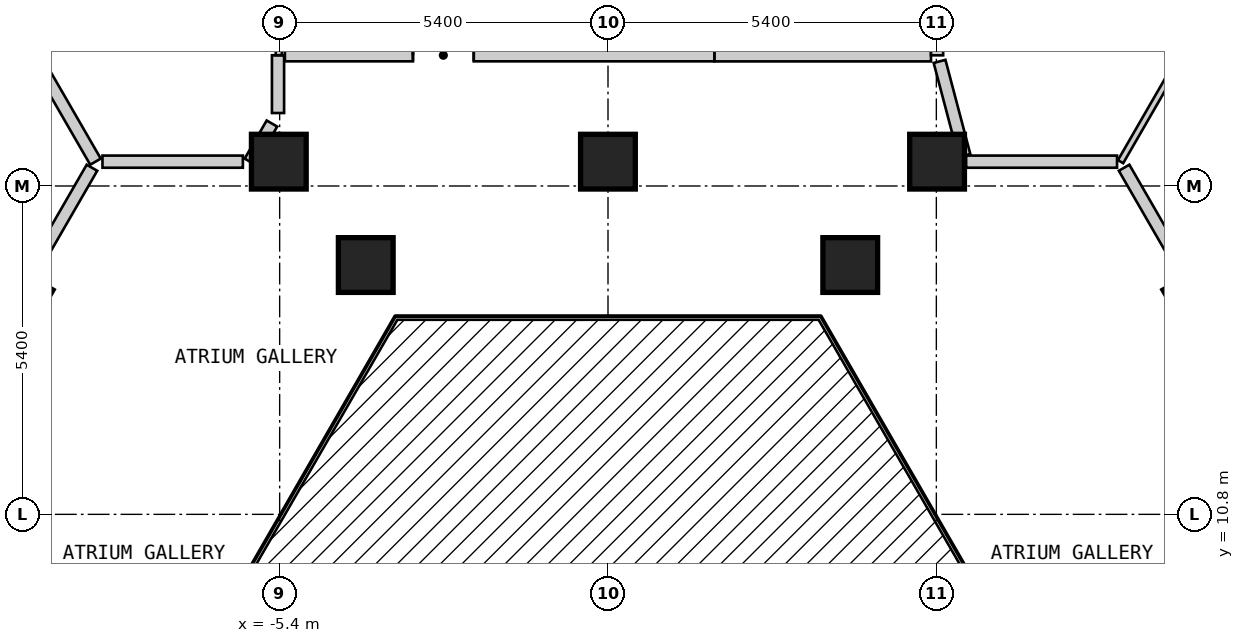
"""IFC4 building model, lengths in metres.
Left out: names, types, materials, properties, quantities, classifications, styles, units other than length and angle.
Written with IfcOpenShell. Run it as: python <this file> out.ifc"""

import sys

from ifc_helpers import new_model, si_unit, direction, frame, frame_2d, origin, origin_2d, place, context, subcontext, project, spatial, rectangle, extrude, element, fill, save


model = new_model("IFC4")
c1 = context("Model", 3, precision=1e-05, world=origin(), true_north=direction((0.0, 1.0)))
c2 = subcontext(c1, "Body", "Model", "MODEL_VIEW")
j1 = project(units=[si_unit("LENGTHUNIT", "METRE"), si_unit("PLANEANGLEUNIT", "RADIAN")], contexts=[c1])
p1 = place(None, origin())
s1 = spatial("IfcSite", under=j1, at=p1, CompositionType="ELEMENT")
p2 = place(p1, origin())
s2 = spatial("IfcBuilding", under=s1, at=p2, CompositionType="ELEMENT")
p3 = place(p2, frame((0.0, 0.0, 90.0)))
s3 = spatial("IfcBuildingStorey", under=s2, at=p3, CompositionType="ELEMENT", Elevation=90.0)
for number, where, z_axis, x_axis in (
    (1, (9.743, 14.325, 0.0), (0.0, 0.0, 1.0), (-0.5, 0.866, 0.0)),
    (2, (5.412, 16.6, 0.0), (0.0, 0.0, 1.0), (-1.0, 0.0, 0.0)),
    (3, (3.984, 14.9, 0.0), (0.0, 0.0, 1.0), (1.0, 0.0, 0.0)),
    (4, (-0.001, 16.6, 0.0), (0.0, 0.0, 1.0), (-1.0, 0.0, 0.0)),
    (5, (-3.984, 14.9, 0.0), (0.0, 0.0, 1.0), (1.0, 0.0, 0.0)),
    (6, (-5.414, 16.6, 0.0), (0.0, 0.0, 1.0), (-1.0, 0.0, 0.0)),
    (7, (-9.743, 14.325, 0.0), (0.0, 0.0, 1.0), (-0.5, -0.866, 0.0)),
):
    element("IfcColumn", number, at=place(p3, frame(where, z_axis=z_axis, x_axis=x_axis)), inside=s3, PredefinedType="COLUMN", context=c2, shape_type="SweptSolid", body=[
        extrude(rectangle(XDim=0.9, YDim=0.9, at=origin_2d()), origin(), (0.0, 0.0, 1.0), 3.0),
    ])
p4 = place(p3, frame((5.453, 18.249, 0.0), z_axis=(0.0, 0.0, 1.0), x_axis=(0.255385747764, -0.966839241983, 0.0)))
e8 = element("IfcWall", 8, at=p4, inside=s3, PredefinedType="PARTITIONING", context=c2, shape_type="SweptSolid", body=[
    extrude(rectangle(XDim=1.602, YDim=0.2, at=frame_2d((0.801, 0.0))), origin(), (0.0, 0.0, 1.0), 2.7),
])
p5 = place(p3, frame((8.488, 16.5, 0.0), z_axis=(0.0, 0.0, 1.0), x_axis=(0.499986836607, -0.86603300354, 0.0)))
e9 = element("IfcWall", 9, at=p5, inside=s3, PredefinedType="PARTITIONING", context=c2, shape_type="SweptSolid", body=[
    extrude(rectangle(XDim=20.09, YDim=0.2, at=frame_2d((10.045, 0.0))), origin(), (0.0, 0.0, 1.0), 2.7),
])
p6 = place(p5, frame((14.569, 0.0, 0.0)))
e10 = element("IfcOpeningElement", 10, at=p6, cuts=e9, PredefinedType="OPENING", context=c2, shape_type="SweptSolid", body=[
    extrude(rectangle(XDim=1.0, YDim=2.1, at=frame_2d((0.5, 1.05))), frame((0.0, 0.11, 0.0), z_axis=(0.0, -1.0, 0.0), x_axis=(1.0, 0.0, 0.0)), (0.0, 0.0, 1.0), 0.22),
])
p7 = place(p5, frame((4.547, 0.0, 0.0)))
e11 = element("IfcOpeningElement", 11, at=p7, cuts=e9, PredefinedType="OPENING", context=c2, shape_type="SweptSolid", body=[
    extrude(rectangle(XDim=1.0, YDim=2.1, at=frame_2d((0.5, 1.05))), frame((0.0, 0.11, 0.0), z_axis=(0.0, -1.0, 0.0), x_axis=(1.0, 0.0, 0.0)), (0.0, 0.0, 1.0), 0.22),
])
p8 = place(p3, frame((-8.314, 16.6, 0.0), z_axis=(0.0, 0.0, 1.0), x_axis=(1.0, 0.0, 0.0)))
e12 = element("IfcWall", 12, at=p8, inside=s3, PredefinedType="PARTITIONING", context=c2, shape_type="SweptSolid", body=[
    extrude(rectangle(XDim=2.309, YDim=0.2, at=frame_2d((1.155, 0.0))), origin(), (0.0, 0.0, 1.0), 2.7),
])
p9 = place(p3, frame((5.889, 16.6, 0.0), z_axis=(0.0, 0.0, 1.0), x_axis=(1.0, 0.0, 0.0)))
e13 = element("IfcWall", 13, at=p9, inside=s3, PredefinedType="PARTITIONING", context=c2, shape_type="SweptSolid", body=[
    extrude(rectangle(XDim=2.483, YDim=0.2, at=frame_2d((1.242, 0.0))), origin(), (0.0, 0.0, 1.0), 2.7),
])
p10 = place(p3, frame((1.75, 18.349, 0.0), z_axis=(0.0, 0.0, 1.0), x_axis=(1.0, 0.0, 0.0)))
e14 = element("IfcWall", 14, at=p10, inside=s3, PredefinedType="PARTITIONING", context=c2, shape_type="SweptSolid", body=[
    extrude(rectangle(XDim=3.562, YDim=0.2, at=frame_2d((1.781, 0.0))), origin(), (0.0, 0.0, 1.0), 2.7),
])
p11 = place(p3, frame((-5.314, 18.35, 0.0), z_axis=(0.0, 0.0, 1.0), x_axis=(1.0, 0.0, 0.0)))
e15 = element("IfcWall", 15, at=p11, inside=s3, PredefinedType="PARTITIONING", context=c2, shape_type="SweptSolid", body=[
    extrude(rectangle(XDim=7.063, YDim=0.2, at=frame_2d((3.531, 0.0))), origin(), (0.0, 0.0, 1.0), 2.7),
])
p12 = place(p11, frame((2.106, 0.0, 0.0)))
e16 = element("IfcOpeningElement", 16, at=p12, cuts=e15, PredefinedType="OPENING", context=c2, shape_type="SweptSolid", body=[
    extrude(rectangle(XDim=1.0, YDim=2.1, at=frame_2d((0.5, 1.05))), frame((0.0, 0.11, 0.0), z_axis=(0.0, -1.0, 0.0), x_axis=(1.0, 0.0, 0.0)), (0.0, 0.0, 1.0), 0.22),
])
p13 = place(p3, frame((-5.889, 16.6, 0.0), z_axis=(0.0, 0.0, 1.0), x_axis=(0.499839240638, 0.866118198353, 0.0)))
e17 = element("IfcWall", 17, at=p13, inside=s3, PredefinedType="PARTITIONING", context=c2, shape_type="SweptSolid", body=[
    extrude(rectangle(XDim=0.724, YDim=0.2, at=frame_2d((0.362, 0.0))), origin(), (0.0, 0.0, 1.0), 2.7),
])
p14 = place(p3, frame((-18.562, -0.951, 0.0), z_axis=(0.0, 0.0, 1.0), x_axis=(0.499987097491, 0.866032852923, 0.0)))
e18 = element("IfcWall", 18, at=p14, inside=s3, PredefinedType="PARTITIONING", context=c2, shape_type="SweptSolid", body=[
    extrude(rectangle(XDim=20.15, YDim=0.2, at=frame_2d((10.075, 0.0))), origin(), (0.0, 0.0, 1.0), 2.7),
])
p15 = place(p14, frame((14.627, 0.0, 0.0)))
e19 = element("IfcOpeningElement", 19, at=p15, cuts=e18, PredefinedType="OPENING", context=c2, shape_type="SweptSolid", body=[
    extrude(rectangle(XDim=1.0, YDim=2.1, at=frame_2d((0.5, 1.05))), frame((0.0, 0.11, 0.0), z_axis=(0.0, -1.0, 0.0), x_axis=(1.0, 0.0, 0.0)), (0.0, 0.0, 1.0), 0.22),
])
p16 = place(p14, frame((9.604, 0.0, 0.0)))
e20 = element("IfcOpeningElement", 20, at=p16, cuts=e18, PredefinedType="OPENING", context=c2, shape_type="SweptSolid", body=[
    extrude(rectangle(XDim=1.0, YDim=2.1, at=frame_2d((0.5, 1.05))), frame((0.0, 0.11, 0.0), z_axis=(0.0, -1.0, 0.0), x_axis=(1.0, 0.0, 0.0)), (0.0, 0.0, 1.0), 0.22),
])
p17 = place(p3, frame((-5.427, 17.4, 0.0), z_axis=(0.0, 0.0, 1.0), x_axis=(0.0, 1.0, 0.0)))
e21 = element("IfcWall", 21, at=p17, inside=s3, PredefinedType="PARTITIONING", context=c2, shape_type="SweptSolid", body=[
    extrude(rectangle(XDim=0.95, YDim=0.2, at=frame_2d((0.475, 0.0))), origin(), (0.0, 0.0, 1.0), 2.7),
])
p18 = place(p3, frame((8.43, 16.6, 0.0), z_axis=(0.0, 0.0, 1.0), x_axis=(0.499951460778, 0.866053426104, 0.0)))
e22 = element("IfcWall", 22, at=p18, inside=s3, PredefinedType="PARTITIONING", context=c2, shape_type="SweptSolid", body=[
    extrude(rectangle(XDim=4.553, YDim=0.1, at=frame_2d((2.276, 0.0))), origin(), (0.0, 0.0, 1.0), 2.7),
])
p19 = place(p3, frame((-5.414, 18.35, 0.0), z_axis=(0.0, 0.0, 1.0), x_axis=(0.0, 1.0, 0.0)))
e23 = element("IfcWall", 23, at=p19, inside=s3, PredefinedType="PARTITIONING", context=c2, shape_type="SweptSolid", body=[
    extrude(rectangle(XDim=8.35, YDim=0.1, at=frame_2d((4.175, 0.0))), origin(), (0.0, 0.0, 1.0), 2.7),
])
p20 = place(p19, frame((1.322, 0.0, 0.0)))
e24 = element("IfcOpeningElement", 24, at=p20, cuts=e23, PredefinedType="OPENING", context=c2, shape_type="SweptSolid", body=[
    extrude(rectangle(XDim=0.8, YDim=2.1, at=frame_2d((0.4, 1.05))), frame((0.0, 0.06, 0.0), z_axis=(0.0, -1.0, 0.0), x_axis=(1.0, 0.0, 0.0)), (0.0, 0.0, 1.0), 0.12),
])
p21 = place(p19, frame((5.447, 0.0, 0.0)))
e25 = element("IfcOpeningElement", 25, at=p21, cuts=e23, PredefinedType="OPENING", context=c2, shape_type="SweptSolid", body=[
    extrude(rectangle(XDim=0.9, YDim=2.1, at=frame_2d((0.45, 1.05))), frame((0.0, 0.06, 0.0), z_axis=(0.0, -1.0, 0.0), x_axis=(1.0, 0.0, 0.0)), (0.0, 0.0, 1.0), 0.12),
])
p22 = place(p3, frame((-10.727, 20.58, 0.0), z_axis=(0.0, 0.0, 1.0), x_axis=(0.500041272028, -0.866001574057, 0.0)))
e26 = element("IfcWall", 26, at=p22, inside=s3, PredefinedType="PARTITIONING", context=c2, shape_type="SweptSolid", body=[
    extrude(rectangle(XDim=4.596, YDim=0.2, at=frame_2d((2.298, 0.0))), origin(), (0.0, 0.0, 1.0), 2.7),
])
p23 = place(p3, frame((5.412, 18.349, 0.0), z_axis=(0.0, 0.0, 1.0), x_axis=(0.0, 1.0, 0.0)))
e27 = element("IfcWall", 27, at=p23, inside=s3, PredefinedType="PARTITIONING", context=c2, shape_type="SweptSolid", body=[
    extrude(rectangle(XDim=8.351, YDim=0.2, at=frame_2d((4.175, 0.0))), origin(), (0.0, 0.0, 1.0), 2.7),
])
p24 = place(p12, origin())
e28 = element("IfcDoor", 28, at=p24, inside=s3, OperationType="SINGLE_SWING_LEFT", PredefinedType="DOOR", context=c2, shape_type="SweptSolid", body=[
    extrude(rectangle(XDim=1.0, YDim=2.1, at=frame_2d((0.5, 1.05))), frame((0.0, 0.025, 0.0), z_axis=(0.0, -1.0, 0.0), x_axis=(1.0, 0.0, 0.0)), (0.0, 0.0, 1.0), 0.05),
])
fill(e16, e28)
save(model, sys.argv[1])
